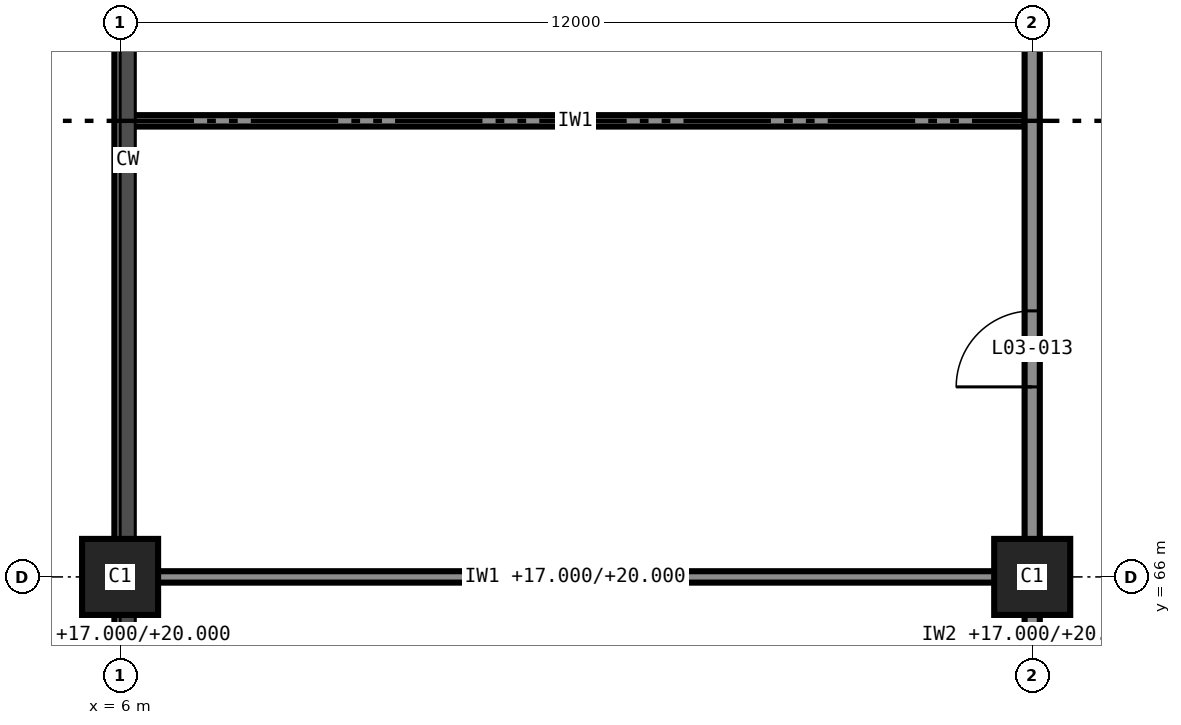
"""IFC4 building model, lengths in metres.
Left out: names, types, materials, properties, quantities, classifications, styles, units other than length and angle.
Written with IfcOpenShell. Run it as: python <this file> out.ifc"""

import sys

from ifc_helpers import new_model, si_unit, direction, frame, frame_2d, origin, origin_2d, place, context, subcontext, project, spatial, rectangle, extrude, element, fill, save


model = new_model("IFC4")
c1 = context("Model", 3, precision=1e-05, world=origin(), true_north=direction((0.0, 1.0)))
c2 = subcontext(c1, "Body", "Model", "MODEL_VIEW")
j1 = project(units=[si_unit("LENGTHUNIT", "METRE"), si_unit("PLANEANGLEUNIT", "RADIAN")], contexts=[c1])
p1 = place(None, origin())
s1 = spatial("IfcSite", under=j1, at=p1, CompositionType="ELEMENT")
p2 = place(p1, origin())
s2 = spatial("IfcBuilding", under=s1, at=p2, CompositionType="ELEMENT")
p3 = place(p2, frame((0.0, 0.0, 17.0)))
s3 = spatial("IfcBuildingStorey", under=s2, at=p3, CompositionType="ELEMENT", Elevation=17.0)
for number, where, z_axis, x_axis in (
    (1, (6.0, 66.0, 0.0), (0.0, 0.0, 1.0), (1.0, 0.0, 0.0)),
    (2, (18.0, 66.0, 0.0), (0.0, 0.0, 1.0), (1.0, 0.0, 0.0)),
):
    element("IfcColumn", number, at=place(p3, frame(where, z_axis=z_axis, x_axis=x_axis)), inside=s3, PredefinedType="COLUMN", context=c2, shape_type="SweptSolid", body=[
        extrude(rectangle(XDim=1.0, YDim=1.0, at=origin_2d()), origin(), (0.0, 0.0, 1.0), 4.0),
    ])
p4 = place(p3, frame((6.075, 66.0, 0.0), z_axis=(0.0, 0.0, 1.0), x_axis=(1.0, 0.0, 0.0)))
e3 = element("IfcWall", 3, at=p4, inside=s3, PredefinedType="PARTITIONING", context=c2, shape_type="SweptSolid", body=[
    extrude(rectangle(XDim=11.825, YDim=0.15, at=frame_2d((5.913, 0.0))), origin(), (0.0, 0.0, 1.0), 3.0),
])
p5 = place(p3, frame((6.075, 72.0, 0.0), z_axis=(0.0, 0.0, 1.0), x_axis=(1.0, 0.0, 0.0)))
e4 = element("IfcWall", 4, at=p5, inside=s3, PredefinedType="PARTITIONING", context=c2, shape_type="SweptSolid", body=[
    extrude(rectangle(XDim=11.825, YDim=0.15, at=frame_2d((5.913, 0.0))), origin(), (0.0, 0.0, 1.0), 3.8),
])
p6 = place(p3, frame((6.0, 54.0, 0.0), z_axis=(0.0, 0.0, 1.0), x_axis=(0.0, 1.0, 0.0)))
e5 = element("IfcWall", 5, at=p6, inside=s3, PredefinedType="PARTITIONING", context=c2, shape_type="SweptSolid", body=[
    extrude(rectangle(XDim=36.0, YDim=0.15, at=frame_2d((18.0, 0.0))), origin(), (0.0, 0.0, 1.0), 3.0),
])
p7 = place(p3, frame((18.0, 54.0, 0.0), z_axis=(0.0, 0.0, 1.0), x_axis=(0.0, 1.0, 0.0)))
e6 = element("IfcWall", 6, at=p7, inside=s3, PredefinedType="PARTITIONING", context=c2, shape_type="SweptSolid", body=[
    extrude(rectangle(XDim=36.0, YDim=0.2, at=frame_2d((18.0, 0.0))), origin(), (0.0, 0.0, 1.0), 3.0),
])
p8 = place(p7, frame((2.5, 0.0, 0.0)))
e7 = element("IfcOpeningElement", 7, at=p8, cuts=e6, PredefinedType="OPENING", context=c2, shape_type="SweptSolid", body=[
    extrude(rectangle(XDim=1.0, YDim=2.1, at=frame_2d((0.5, 1.05))), frame((0.0, 0.11, 0.0), z_axis=(0.0, -1.0, 0.0), x_axis=(1.0, 0.0, 0.0)), (0.0, 0.0, 1.0), 0.22),
])
p9 = place(p7, frame((8.5, 0.0, 0.0)))
e8 = element("IfcOpeningElement", 8, at=p9, cuts=e6, PredefinedType="OPENING", context=c2, shape_type="SweptSolid", body=[
    extrude(rectangle(XDim=1.0, YDim=2.1, at=frame_2d((0.5, 1.05))), frame((0.0, 0.11, 0.0), z_axis=(0.0, -1.0, 0.0), x_axis=(1.0, 0.0, 0.0)), (0.0, 0.0, 1.0), 0.22),
])
p10 = place(p7, frame((14.5, 0.0, 0.0)))
e9 = element("IfcOpeningElement", 9, at=p10, cuts=e6, PredefinedType="OPENING", context=c2, shape_type="SweptSolid", body=[
    extrude(rectangle(XDim=1.0, YDim=2.1, at=frame_2d((0.5, 1.05))), frame((0.0, 0.11, 0.0), z_axis=(0.0, -1.0, 0.0), x_axis=(1.0, 0.0, 0.0)), (0.0, 0.0, 1.0), 0.22),
])
p11 = place(p7, frame((20.5, 0.0, 0.0)))
e10 = element("IfcOpeningElement", 10, at=p11, cuts=e6, PredefinedType="OPENING", context=c2, shape_type="SweptSolid", body=[
    extrude(rectangle(XDim=1.0, YDim=2.1, at=frame_2d((0.5, 1.05))), frame((0.0, 0.11, 0.0), z_axis=(0.0, -1.0, 0.0), x_axis=(1.0, 0.0, 0.0)), (0.0, 0.0, 1.0), 0.22),
])
p12 = place(p7, frame((26.5, 0.0, 0.0)))
e11 = element("IfcOpeningElement", 11, at=p12, cuts=e6, PredefinedType="OPENING", context=c2, shape_type="SweptSolid", body=[
    extrude(rectangle(XDim=1.0, YDim=2.1, at=frame_2d((0.5, 1.05))), frame((0.0, 0.11, 0.0), z_axis=(0.0, -1.0, 0.0), x_axis=(1.0, 0.0, 0.0)), (0.0, 0.0, 1.0), 0.22),
])
p13 = place(p7, frame((32.5, 0.0, 0.0)))
e12 = element("IfcOpeningElement", 12, at=p13, cuts=e6, PredefinedType="OPENING", context=c2, shape_type="SweptSolid", body=[
    extrude(rectangle(XDim=1.0, YDim=2.1, at=frame_2d((0.5, 1.05))), frame((0.0, 0.11, 0.0), z_axis=(0.0, -1.0, 0.0), x_axis=(1.0, 0.0, 0.0)), (0.0, 0.0, 1.0), 0.22),
])
p14 = place(p10, origin())
e13 = element("IfcDoor", 13, at=p14, inside=s3, OperationType="SINGLE_SWING_RIGHT", PredefinedType="DOOR", context=c2, shape_type="SweptSolid", body=[
    extrude(rectangle(XDim=1.0, YDim=2.1, at=frame_2d((0.5, 1.05))), frame((0.0, 0.025, 0.0), z_axis=(0.0, -1.0, 0.0), x_axis=(1.0, 0.0, 0.0)), (0.0, 0.0, 1.0), 0.05),
])
fill(e9, e13)
save(model, sys.argv[1])
